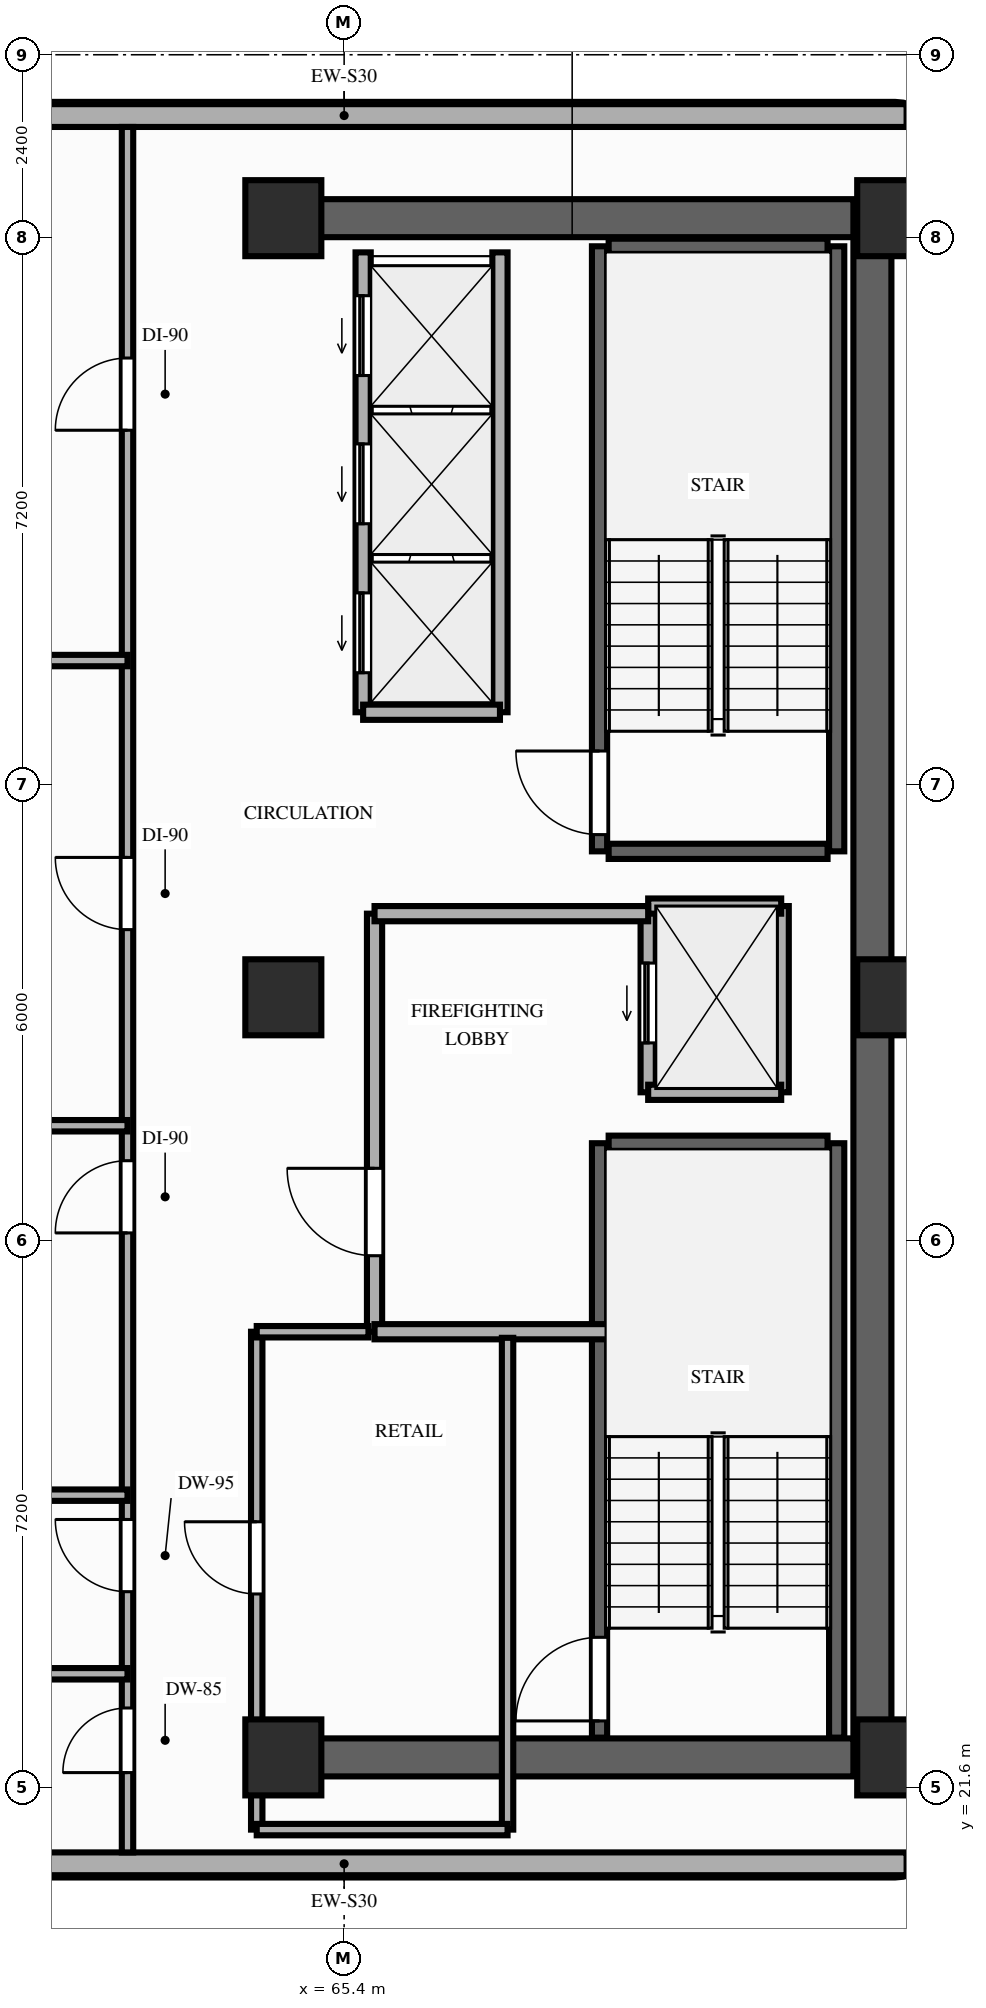
"""IFC4 building model, lengths in metres.
Left out: names, types, materials, properties, quantities, classifications, styles, units other than length and angle.
Written with IfcOpenShell. Run it as: python <this file> out.ifc"""

import sys

from ifc_helpers import new_model, si_unit, direction, frame, frame_2d, origin, origin_2d, place, context, subcontext, project, spatial, rectangle, extrude, element, fill, save


model = new_model("IFC4")
c1 = context("Model", 3, precision=1e-05, world=origin(), true_north=direction((0.0, 1.0)))
c2 = subcontext(c1, "Body", "Model", "MODEL_VIEW")
j1 = project(units=[si_unit("LENGTHUNIT", "METRE"), si_unit("PLANEANGLEUNIT", "RADIAN")], contexts=[c1])
p1 = place(None, origin())
s1 = spatial("IfcSite", under=j1, at=p1, CompositionType="ELEMENT")
p2 = place(p1, origin())
s2 = spatial("IfcBuilding", under=s1, at=p2, CompositionType="ELEMENT")
p3 = place(p2, frame((0.0, 0.0, 96.2)))
s3 = spatial("IfcBuildingStorey", under=s2, at=p3, CompositionType="ELEMENT", Elevation=96.2)
for number, where, z_axis, x_axis in (
    (1, (64.6, 22.0, 0.0), (0.0, 0.0, 1.0), (1.0, 0.0, 0.0)),
    (2, (72.65, 22.0, 0.0), (0.0, 0.0, 1.0), (1.0, 0.0, 0.0)),
    (3, (64.6, 32.0, 0.0), (0.0, 0.0, 1.0), (1.0, 0.0, 0.0)),
    (4, (72.65, 32.0, 0.0), (0.0, 0.0, 1.0), (1.0, 0.0, 0.0)),
    (5, (64.6, 42.25, 0.0), (0.0, 0.0, 1.0), (1.0, 0.0, 0.0)),
    (6, (72.65, 42.25, 0.0), (0.0, 0.0, 1.0), (1.0, 0.0, 0.0)),
):
    element("IfcColumn", number, at=place(p3, frame(where, z_axis=z_axis, x_axis=x_axis)), inside=s3, PredefinedType="COLUMN", context=c2, shape_type="SweptSolid", body=[
        extrude(rectangle(XDim=1.0, YDim=1.0, at=origin_2d()), origin(), (0.0, 0.0, 1.0), 3.2),
    ])
for number, where, z_axis, x_axis in (
    (7, (72.8, 43.6, 0.0), (0.0, 0.0, 1.0), (-1.0, 0.0, 0.0)),
    (8, (58.0, 20.6, 0.0), (0.0, 0.0, 1.0), (1.0, 0.0, 0.0)),
):
    element("IfcWall", number, at=place(p3, frame(where, z_axis=z_axis, x_axis=x_axis)), inside=s3, PredefinedType="STANDARD", context=c2, shape_type="SweptSolid", body=[
        extrude(rectangle(XDim=14.8, YDim=0.3, at=frame_2d((7.4, 0.0))), origin(), (0.0, 0.0, 1.0), 3.02),
    ])
p4 = place(p3, frame((72.35, 22.0, 0.0), z_axis=(0.0, 0.0, 1.0), x_axis=(0.0, 1.0, 0.0)))
e9 = element("IfcWall", 9, at=p4, inside=s3, PredefinedType="SHEAR", context=c2, shape_type="SweptSolid", body=[
    extrude(rectangle(XDim=20.25, YDim=0.5, at=frame_2d((10.125, 0.0))), origin(), (0.0, 0.0, 1.0), 3.02),
])
for number, where, z_axis, x_axis in (
    (10, (64.6, 42.25, 0.0), (0.0, 0.0, 1.0), (1.0, 0.0, 0.0)),
    (11, (64.6, 22.0, 0.0), (0.0, 0.0, 1.0), (1.0, 0.0, 0.0)),
):
    element("IfcWall", number, at=place(p3, frame(where, z_axis=z_axis, x_axis=x_axis)), inside=s3, PredefinedType="SHEAR", context=c2, shape_type="SweptSolid", body=[
        extrude(rectangle(XDim=7.5, YDim=0.5, at=frame_2d((3.75, 0.0))), origin(), (0.0, 0.0, 1.0), 3.02),
    ])
p5 = place(p3, frame((68.76, 22.26, 0.0), z_axis=(0.0, 0.0, 1.0), x_axis=(0.0, 1.0, 0.0)))
e12 = element("IfcWall", 12, at=p5, inside=s3, PredefinedType="SHEAR", context=c2, shape_type="SweptSolid", body=[
    extrude(rectangle(XDim=7.82, YDim=0.2, at=frame_2d((3.91, 0.0))), origin(), (0.0, 0.0, 1.0), 3.02),
])
p6 = place(p5, frame((0.22, 0.0, 0.0)))
e13 = element("IfcOpeningElement", 13, at=p6, cuts=e12, PredefinedType="OPENING", context=c2, shape_type="SweptSolid", body=[
    extrude(rectangle(XDim=1.1, YDim=2.15, at=frame_2d((0.55, 1.075))), frame((0.0, 0.11, 0.0), z_axis=(0.0, -1.0, 0.0), x_axis=(1.0, 0.0, 0.0)), (0.0, 0.0, 1.0), 0.22),
])
p7 = place(p3, frame((71.88, 22.26, 0.0), z_axis=(0.0, 0.0, 1.0), x_axis=(0.0, 1.0, 0.0)))
e14 = element("IfcWall", 14, at=p7, inside=s3, PredefinedType="SHEAR", context=c2, shape_type="SweptSolid", body=[
    extrude(rectangle(XDim=7.82, YDim=0.2, at=frame_2d((3.91, 0.0))), origin(), (0.0, 0.0, 1.0), 3.02),
])
p8 = place(p3, frame((68.88, 30.08, 0.0), z_axis=(0.0, 0.0, 1.0), x_axis=(1.0, 0.0, 0.0)))
e15 = element("IfcWall", 15, at=p8, inside=s3, PredefinedType="SHEAR", context=c2, shape_type="SweptSolid", body=[
    extrude(rectangle(XDim=2.88, YDim=0.2, at=frame_2d((1.44, 0.0))), origin(), (0.0, 0.0, 1.0), 3.02),
])
p9 = place(p3, frame((68.76, 33.92, 0.0), z_axis=(0.0, 0.0, 1.0), x_axis=(0.0, 1.0, 0.0)))
e16 = element("IfcWall", 16, at=p9, inside=s3, PredefinedType="SHEAR", context=c2, shape_type="SweptSolid", body=[
    extrude(rectangle(XDim=7.96, YDim=0.2, at=frame_2d((3.98, 0.0))), origin(), (0.0, 0.0, 1.0), 3.02),
])
p10 = place(p9, frame((0.22, 0.0, 0.0)))
e17 = element("IfcOpeningElement", 17, at=p10, cuts=e16, PredefinedType="OPENING", context=c2, shape_type="SweptSolid", body=[
    extrude(rectangle(XDim=1.1, YDim=2.15, at=frame_2d((0.55, 1.075))), frame((0.0, 0.11, 0.0), z_axis=(0.0, -1.0, 0.0), x_axis=(1.0, 0.0, 0.0)), (0.0, 0.0, 1.0), 0.22),
])
p11 = place(p3, frame((71.88, 33.92, 0.0), z_axis=(0.0, 0.0, 1.0), x_axis=(0.0, 1.0, 0.0)))
e18 = element("IfcWall", 18, at=p11, inside=s3, PredefinedType="SHEAR", context=c2, shape_type="SweptSolid", body=[
    extrude(rectangle(XDim=7.96, YDim=0.2, at=frame_2d((3.98, 0.0))), origin(), (0.0, 0.0, 1.0), 3.02),
])
for number, where, z_axis, x_axis in (
    (19, (68.88, 41.88, 0.0), (0.0, 0.0, 1.0), (1.0, 0.0, 0.0)),
    (20, (68.88, 33.92, 0.0), (0.0, 0.0, 1.0), (1.0, 0.0, 0.0)),
):
    element("IfcWall", number, at=place(p3, frame(where, z_axis=z_axis, x_axis=x_axis)), inside=s3, PredefinedType="SHEAR", context=c2, shape_type="SweptSolid", body=[
        extrude(rectangle(XDim=2.88, YDim=0.2, at=frame_2d((1.44, 0.0))), origin(), (0.0, 0.0, 1.0), 3.02),
    ])
p12 = place(p3, frame((65.65, 35.75, 0.0), z_axis=(0.0, 0.0, 1.0), x_axis=(0.0, 1.0, 0.0)))
e21 = element("IfcWall", 21, at=p12, inside=s3, PredefinedType="MOVABLE", context=c2, shape_type="SweptSolid", body=[
    extrude(rectangle(XDim=6.05, YDim=0.2, at=frame_2d((3.025, 0.0))), origin(), (0.0, 0.0, 1.0), 3.02),
])
p13 = place(p12, frame((0.52, 0.0, 0.0)))
e22 = element("IfcOpeningElement", 22, at=p13, cuts=e21, PredefinedType="OPENING", context=c2, shape_type="SweptSolid", body=[
    extrude(rectangle(XDim=1.05, YDim=2.15, at=frame_2d((0.525, 1.075))), frame((0.0, 0.11, 0.0), z_axis=(0.0, -1.0, 0.0), x_axis=(1.0, 0.0, 0.0)), (0.0, 0.0, 1.0), 0.22),
])
p14 = place(p12, frame((2.48, 0.0, 0.0)))
e23 = element("IfcOpeningElement", 23, at=p14, cuts=e21, PredefinedType="OPENING", context=c2, shape_type="SweptSolid", body=[
    extrude(rectangle(XDim=1.05, YDim=2.15, at=frame_2d((0.525, 1.075))), frame((0.0, 0.11, 0.0), z_axis=(0.0, -1.0, 0.0), x_axis=(1.0, 0.0, 0.0)), (0.0, 0.0, 1.0), 0.22),
])
p15 = place(p12, frame((4.43, 0.0, 0.0)))
e24 = element("IfcOpeningElement", 24, at=p15, cuts=e21, PredefinedType="OPENING", context=c2, shape_type="SweptSolid", body=[
    extrude(rectangle(XDim=1.05, YDim=2.15, at=frame_2d((0.525, 1.075))), frame((0.0, 0.11, 0.0), z_axis=(0.0, -1.0, 0.0), x_axis=(1.0, 0.0, 0.0)), (0.0, 0.0, 1.0), 0.22),
])
p16 = place(p3, frame((67.45, 35.75, 0.0), z_axis=(0.0, 0.0, 1.0), x_axis=(0.0, 1.0, 0.0)))
e25 = element("IfcWall", 25, at=p16, inside=s3, PredefinedType="MOVABLE", context=c2, shape_type="SweptSolid", body=[
    extrude(rectangle(XDim=6.05, YDim=0.2, at=frame_2d((3.025, 0.0))), origin(), (0.0, 0.0, 1.0), 3.02),
])
p17 = place(p3, frame((65.65, 35.75, 0.0), z_axis=(0.0, 0.0, 1.0), x_axis=(1.0, 0.0, 0.0)))
e26 = element("IfcWall", 26, at=p17, inside=s3, PredefinedType="MOVABLE", context=c2, shape_type="SweptSolid", body=[
    extrude(rectangle(XDim=1.8, YDim=0.2, at=frame_2d((0.9, 0.0))), origin(), (0.0, 0.0, 1.0), 3.02),
])
p18 = place(p3, frame((69.4, 30.75, 0.0), z_axis=(0.0, 0.0, 1.0), x_axis=(0.0, 1.0, 0.0)))
e27 = element("IfcWall", 27, at=p18, inside=s3, PredefinedType="MOVABLE", context=c2, shape_type="SweptSolid", body=[
    extrude(rectangle(XDim=2.45, YDim=0.2, at=frame_2d((1.225, 0.0))), origin(), (0.0, 0.0, 1.0), 3.02),
])
p19 = place(p18, frame((0.65, 0.0, 0.0)))
e28 = element("IfcOpeningElement", 28, at=p19, cuts=e27, PredefinedType="OPENING", context=c2, shape_type="SweptSolid", body=[
    extrude(rectangle(XDim=1.05, YDim=2.15, at=frame_2d((0.525, 1.075))), frame((0.0, 0.11, 0.0), z_axis=(0.0, -1.0, 0.0), x_axis=(1.0, 0.0, 0.0)), (0.0, 0.0, 1.0), 0.22),
])
p20 = place(p3, frame((71.15, 30.75, 0.0), z_axis=(0.0, 0.0, 1.0), x_axis=(0.0, 1.0, 0.0)))
e29 = element("IfcWall", 29, at=p20, inside=s3, PredefinedType="MOVABLE", context=c2, shape_type="SweptSolid", body=[
    extrude(rectangle(XDim=2.45, YDim=0.2, at=frame_2d((1.225, 0.0))), origin(), (0.0, 0.0, 1.0), 3.02),
])
for number, where, z_axis, x_axis in (
    (30, (69.4, 33.2, 0.0), (0.0, 0.0, 1.0), (1.0, 0.0, 0.0)),
    (31, (69.4, 30.75, 0.0), (0.0, 0.0, 1.0), (1.0, 0.0, 0.0)),
):
    element("IfcWall", number, at=place(p3, frame(where, z_axis=z_axis, x_axis=x_axis)), inside=s3, PredefinedType="MOVABLE", context=c2, shape_type="SweptSolid", body=[
        extrude(rectangle(XDim=1.75, YDim=0.2, at=frame_2d((0.875, 0.0))), origin(), (0.0, 0.0, 1.0), 3.02),
    ])
p21 = place(p3, frame((65.8, 27.6, 0.0), z_axis=(0.0, 0.0, 1.0), x_axis=(0.0, 1.0, 0.0)))
e32 = element("IfcWall", 32, at=p21, inside=s3, PredefinedType="PARTITIONING", context=c2, shape_type="SweptSolid", body=[
    extrude(rectangle(XDim=5.5, YDim=0.2, at=frame_2d((2.75, 0.0))), origin(), (0.0, 0.0, 1.0), 3.02),
])
p22 = place(p21, frame((1.0, 0.0, 0.0)))
e33 = element("IfcOpeningElement", 33, at=p22, cuts=e32, PredefinedType="OPENING", context=c2, shape_type="SweptSolid", body=[
    extrude(rectangle(XDim=1.15, YDim=2.15, at=frame_2d((0.575, 1.075))), frame((0.0, 0.11, 0.0), z_axis=(0.0, -1.0, 0.0), x_axis=(1.0, 0.0, 0.0)), (0.0, 0.0, 1.0), 0.22),
])
p23 = place(p3, frame((65.8, 33.1, 0.0), z_axis=(0.0, 0.0, 1.0), x_axis=(1.0, 0.0, 0.0)))
e34 = element("IfcWall", 34, at=p23, inside=s3, PredefinedType="PARTITIONING", context=c2, shape_type="SweptSolid", body=[
    extrude(rectangle(XDim=3.6, YDim=0.2, at=frame_2d((1.8, 0.0))), origin(), (0.0, 0.0, 1.0), 3.02),
])
p24 = place(p3, frame((65.8, 27.6, 0.0), z_axis=(0.0, 0.0, 1.0), x_axis=(1.0, 0.0, 0.0)))
e35 = element("IfcWall", 35, at=p24, inside=s3, PredefinedType="PARTITIONING", context=c2, shape_type="SweptSolid", body=[
    extrude(rectangle(XDim=3.4, YDim=0.2, at=frame_2d((1.7, 0.0))), origin(), (0.0, 0.0, 1.0), 3.02),
])
p25 = place(p3, frame((64.25, 21.05, 0.0), z_axis=(0.0, 0.0, 1.0), x_axis=(0.0, 1.0, 0.0)))
e36 = element("IfcWall", 36, at=p25, inside=s3, PredefinedType="PARTITIONING", context=c2, shape_type="SweptSolid", body=[
    extrude(rectangle(XDim=6.55, YDim=0.15, at=frame_2d((3.275, 0.0))), origin(), (0.0, 0.0, 1.0), 2.6),
])
p26 = place(p25, frame((3.1, 0.0, 0.0)))
e37 = element("IfcOpeningElement", 37, at=p26, cuts=e36, PredefinedType="OPENING", context=c2, shape_type="SweptSolid", body=[
    extrude(rectangle(XDim=0.95, YDim=2.15, at=frame_2d((0.475, 1.075))), frame((0.0, 0.085, 0.0), z_axis=(0.0, -1.0, 0.0), x_axis=(1.0, 0.0, 0.0)), (0.0, 0.0, 1.0), 0.17),
])
p27 = place(p3, frame((67.55, 21.05, 0.0), z_axis=(0.0, 0.0, 1.0), x_axis=(0.0, 1.0, 0.0)))
e38 = element("IfcWall", 38, at=p27, inside=s3, PredefinedType="PARTITIONING", context=c2, shape_type="SweptSolid", body=[
    extrude(rectangle(XDim=6.47, YDim=0.15, at=frame_2d((3.235, 0.0))), origin(), (0.0, 0.0, 1.0), 2.6),
])
p28 = place(p3, frame((64.25, 21.05, 0.0), z_axis=(0.0, 0.0, 1.0), x_axis=(1.0, 0.0, 0.0)))
e39 = element("IfcWall", 39, at=p28, inside=s3, PredefinedType="PARTITIONING", context=c2, shape_type="SweptSolid", body=[
    extrude(rectangle(XDim=3.3, YDim=0.15, at=frame_2d((1.65, 0.0))), origin(), (0.0, 0.0, 1.0), 3.02),
])
p29 = place(p3, frame((64.25, 27.6, 0.0), z_axis=(0.0, 0.0, 1.0), x_axis=(1.0, 0.0, 0.0)))
e40 = element("IfcWall", 40, at=p29, inside=s3, PredefinedType="PARTITIONING", context=c2, shape_type="SweptSolid", body=[
    extrude(rectangle(XDim=1.47, YDim=0.15, at=frame_2d((0.735, 0.0))), origin(), (0.0, 0.0, 1.0), 2.6),
])
p30 = place(p3, frame((62.55, 20.75, 0.0), z_axis=(0.0, 0.0, 1.0), x_axis=(0.0, 1.0, 0.0)))
e41 = element("IfcWall", 41, at=p30, inside=s3, PredefinedType="PARTITIONING", context=c2, shape_type="SweptSolid", body=[
    extrude(rectangle(XDim=22.7, YDim=0.15, at=frame_2d((11.35, 0.0))), origin(), (0.0, 0.0, 1.0), 2.6),
])
p31 = place(p30, frame((1.05, 0.0, 0.0)))
e42 = element("IfcOpeningElement", 42, at=p31, cuts=e41, PredefinedType="OPENING", context=c2, shape_type="SweptSolid", body=[
    extrude(rectangle(XDim=0.85, YDim=2.1, at=frame_2d((0.425, 1.05))), frame((0.0, 0.085, 0.0), z_axis=(0.0, -1.0, 0.0), x_axis=(1.0, 0.0, 0.0)), (0.0, 0.0, 1.0), 0.17),
])
p32 = place(p30, frame((3.43, 0.0, 0.0)))
e43 = element("IfcOpeningElement", 43, at=p32, cuts=e41, PredefinedType="OPENING", context=c2, shape_type="SweptSolid", body=[
    extrude(rectangle(XDim=0.95, YDim=2.1, at=frame_2d((0.475, 1.05))), frame((0.0, 0.085, 0.0), z_axis=(0.0, -1.0, 0.0), x_axis=(1.0, 0.0, 0.0)), (0.0, 0.0, 1.0), 0.17),
])
p33 = place(p30, frame((8.15, 0.0, 0.0)))
e44 = element("IfcOpeningElement", 44, at=p33, cuts=e41, PredefinedType="OPENING", context=c2, shape_type="SweptSolid", body=[
    extrude(rectangle(XDim=0.95, YDim=2.15, at=frame_2d((0.475, 1.075))), frame((0.0, 0.085, 0.0), z_axis=(0.0, -1.0, 0.0), x_axis=(1.0, 0.0, 0.0)), (0.0, 0.0, 1.0), 0.17),
])
p34 = place(p30, frame((12.14, 0.0, 0.0)))
e45 = element("IfcOpeningElement", 45, at=p34, cuts=e41, PredefinedType="OPENING", context=c2, shape_type="SweptSolid", body=[
    extrude(rectangle(XDim=0.95, YDim=2.15, at=frame_2d((0.475, 1.075))), frame((0.0, 0.085, 0.0), z_axis=(0.0, -1.0, 0.0), x_axis=(1.0, 0.0, 0.0)), (0.0, 0.0, 1.0), 0.17),
])
p35 = place(p30, frame((18.71, 0.0, 0.0)))
e46 = element("IfcOpeningElement", 46, at=p35, cuts=e41, PredefinedType="OPENING", context=c2, shape_type="SweptSolid", body=[
    extrude(rectangle(XDim=0.95, YDim=2.15, at=frame_2d((0.475, 1.075))), frame((0.0, 0.085, 0.0), z_axis=(0.0, -1.0, 0.0), x_axis=(1.0, 0.0, 0.0)), (0.0, 0.0, 1.0), 0.17),
])
for number, where, z_axis, x_axis in (
    (47, (57.95, 23.1, 0.0), (0.0, 0.0, 1.0), (1.0, 0.0, 0.0)),
    (48, (57.95, 25.45, 0.0), (0.0, 0.0, 1.0), (1.0, 0.0, 0.0)),
    (49, (57.95, 30.31, 0.0), (0.0, 0.0, 1.0), (1.0, 0.0, 0.0)),
    (50, (57.95, 36.43, 0.0), (0.0, 0.0, 1.0), (1.0, 0.0, 0.0)),
):
    element("IfcWall", number, at=place(p3, frame(where, z_axis=z_axis, x_axis=x_axis)), inside=s3, PredefinedType="PARTITIONING", context=c2, shape_type="SweptSolid", body=[
        extrude(rectangle(XDim=4.6, YDim=0.15, at=frame_2d((2.3, 0.0))), origin(), (0.0, 0.0, 1.0), 2.6),
    ])
p36 = place(p6, origin())
e51 = element("IfcDoor", 51, at=p36, inside=s3, OperationType="SINGLE_SWING_LEFT", PredefinedType="DOOR", context=c2, shape_type="SweptSolid", body=[
    extrude(rectangle(XDim=1.1, YDim=2.15, at=frame_2d((0.55, 1.075))), frame((0.0, 0.025, 0.0), z_axis=(0.0, -1.0, 0.0), x_axis=(1.0, 0.0, 0.0)), (0.0, 0.0, 1.0), 0.05),
])
fill(e13, e51)
p37 = place(p10, origin())
e52 = element("IfcDoor", 52, at=p37, inside=s3, OperationType="SINGLE_SWING_RIGHT", PredefinedType="DOOR", context=c2, shape_type="SweptSolid", body=[
    extrude(rectangle(XDim=1.1, YDim=2.15, at=frame_2d((0.55, 1.075))), frame((0.0, 0.025, 0.0), z_axis=(0.0, -1.0, 0.0), x_axis=(1.0, 0.0, 0.0)), (0.0, 0.0, 1.0), 0.05),
])
fill(e17, e52)
p38 = place(p13, origin())
e53 = element("IfcDoor", 53, at=p38, inside=s3, OperationType="SLIDING_TO_LEFT", PredefinedType="DOOR", context=c2, shape_type="SweptSolid", body=[
    extrude(rectangle(XDim=1.05, YDim=2.15, at=frame_2d((0.525, 1.075))), frame((0.0, 0.025, 0.0), z_axis=(0.0, -1.0, 0.0), x_axis=(1.0, 0.0, 0.0)), (0.0, 0.0, 1.0), 0.05),
])
fill(e22, e53)
p39 = place(p14, origin())
e54 = element("IfcDoor", 54, at=p39, inside=s3, OperationType="SLIDING_TO_LEFT", PredefinedType="DOOR", context=c2, shape_type="SweptSolid", body=[
    extrude(rectangle(XDim=1.05, YDim=2.15, at=frame_2d((0.525, 1.075))), frame((0.0, 0.025, 0.0), z_axis=(0.0, -1.0, 0.0), x_axis=(1.0, 0.0, 0.0)), (0.0, 0.0, 1.0), 0.05),
])
fill(e23, e54)
p40 = place(p15, origin())
e55 = element("IfcDoor", 55, at=p40, inside=s3, OperationType="SLIDING_TO_LEFT", PredefinedType="DOOR", context=c2, shape_type="SweptSolid", body=[
    extrude(rectangle(XDim=1.05, YDim=2.15, at=frame_2d((0.525, 1.075))), frame((0.0, 0.025, 0.0), z_axis=(0.0, -1.0, 0.0), x_axis=(1.0, 0.0, 0.0)), (0.0, 0.0, 1.0), 0.05),
])
fill(e24, e55)
p41 = place(p19, origin())
e56 = element("IfcDoor", 56, at=p41, inside=s3, OperationType="SLIDING_TO_LEFT", PredefinedType="DOOR", context=c2, shape_type="SweptSolid", body=[
    extrude(rectangle(XDim=1.05, YDim=2.15, at=frame_2d((0.525, 1.075))), frame((0.0, 0.025, 0.0), z_axis=(0.0, -1.0, 0.0), x_axis=(1.0, 0.0, 0.0)), (0.0, 0.0, 1.0), 0.05),
])
fill(e28, e56)
p42 = place(p22, origin())
e57 = element("IfcDoor", 57, at=p42, inside=s3, OperationType="SINGLE_SWING_RIGHT", PredefinedType="DOOR", context=c2, shape_type="SweptSolid", body=[
    extrude(rectangle(XDim=1.15, YDim=2.15, at=frame_2d((0.575, 1.075))), frame((0.0, 0.025, 0.0), z_axis=(0.0, -1.0, 0.0), x_axis=(1.0, 0.0, 0.0)), (0.0, 0.0, 1.0), 0.05),
])
fill(e33, e57)
p43 = place(p26, origin())
e58 = element("IfcDoor", 58, at=p43, inside=s3, OperationType="SINGLE_SWING_RIGHT", PredefinedType="DOOR", context=c2, shape_type="SweptSolid", body=[
    extrude(rectangle(XDim=0.95, YDim=2.15, at=frame_2d((0.475, 1.075))), frame((0.0, 0.025, 0.0), z_axis=(0.0, -1.0, 0.0), x_axis=(1.0, 0.0, 0.0)), (0.0, 0.0, 1.0), 0.05),
])
fill(e37, e58)
p44 = place(p31, origin())
e59 = element("IfcDoor", 59, at=p44, inside=s3, OperationType="SINGLE_SWING_LEFT", PredefinedType="DOOR", context=c2, shape_type="SweptSolid", body=[
    extrude(rectangle(XDim=0.85, YDim=2.1, at=frame_2d((0.425, 1.05))), frame((0.0, 0.025, 0.0), z_axis=(0.0, -1.0, 0.0), x_axis=(1.0, 0.0, 0.0)), (0.0, 0.0, 1.0), 0.05),
])
fill(e42, e59)
p45 = place(p32, origin())
e60 = element("IfcDoor", 60, at=p45, inside=s3, OperationType="SINGLE_SWING_RIGHT", PredefinedType="DOOR", context=c2, shape_type="SweptSolid", body=[
    extrude(rectangle(XDim=0.95, YDim=2.1, at=frame_2d((0.475, 1.05))), frame((0.0, 0.025, 0.0), z_axis=(0.0, -1.0, 0.0), x_axis=(1.0, 0.0, 0.0)), (0.0, 0.0, 1.0), 0.05),
])
fill(e43, e60)
p46 = place(p33, origin())
e61 = element("IfcDoor", 61, at=p46, inside=s3, OperationType="SINGLE_SWING_LEFT", PredefinedType="DOOR", context=c2, shape_type="SweptSolid", body=[
    extrude(rectangle(XDim=0.95, YDim=2.15, at=frame_2d((0.475, 1.075))), frame((0.0, 0.025, 0.0), z_axis=(0.0, -1.0, 0.0), x_axis=(1.0, 0.0, 0.0)), (0.0, 0.0, 1.0), 0.05),
])
fill(e44, e61)
p47 = place(p34, origin())
e62 = element("IfcDoor", 62, at=p47, inside=s3, OperationType="SINGLE_SWING_RIGHT", PredefinedType="DOOR", context=c2, shape_type="SweptSolid", body=[
    extrude(rectangle(XDim=0.95, YDim=2.15, at=frame_2d((0.475, 1.075))), frame((0.0, 0.025, 0.0), z_axis=(0.0, -1.0, 0.0), x_axis=(1.0, 0.0, 0.0)), (0.0, 0.0, 1.0), 0.05),
])
fill(e45, e62)
p48 = place(p35, origin())
e63 = element("IfcDoor", 63, at=p48, inside=s3, OperationType="SINGLE_SWING_LEFT", PredefinedType="DOOR", context=c2, shape_type="SweptSolid", body=[
    extrude(rectangle(XDim=0.95, YDim=2.15, at=frame_2d((0.475, 1.075))), frame((0.0, 0.025, 0.0), z_axis=(0.0, -1.0, 0.0), x_axis=(1.0, 0.0, 0.0)), (0.0, 0.0, 1.0), 0.05),
])
fill(e46, e63)
save(model, sys.argv[1])
